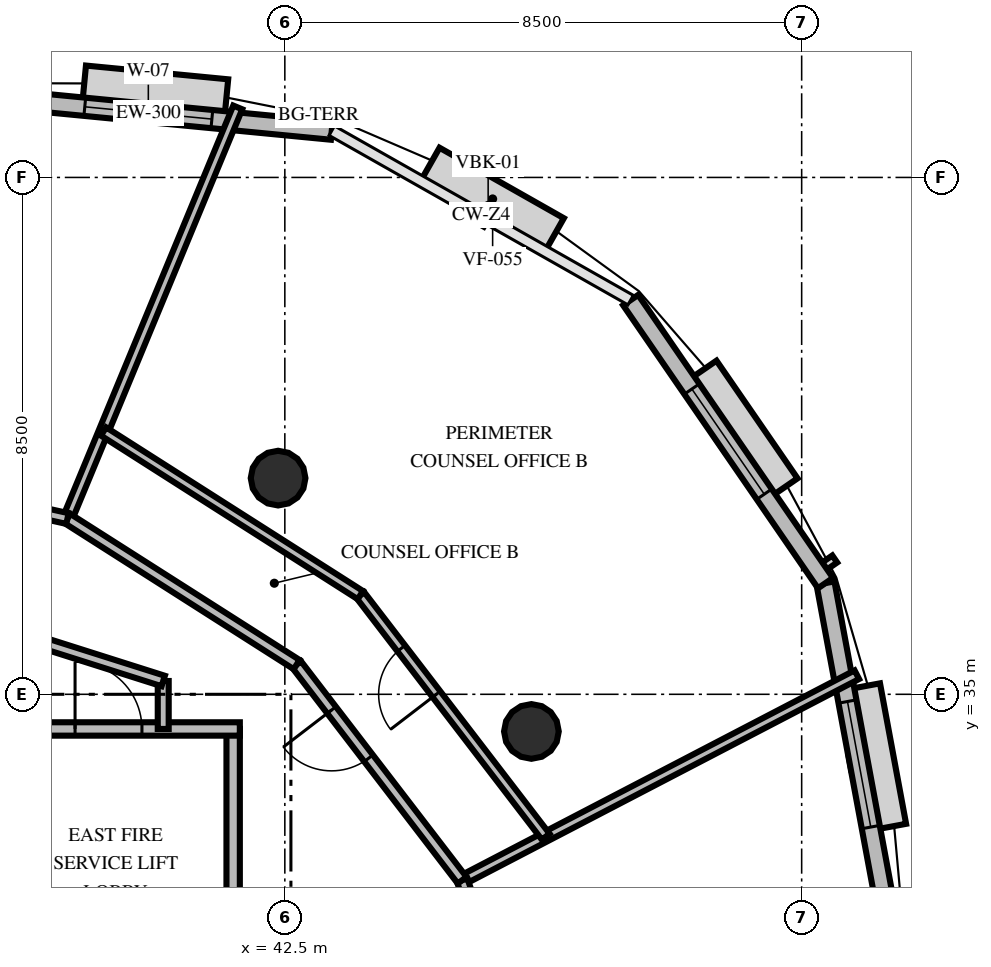
"""IFC4 building model, lengths in metres.
Left out: names, types, materials, properties, quantities, classifications, styles, units other than length and angle.
Written with IfcOpenShell. Run it as: python <this file> out.ifc"""

import sys

from ifc_helpers import new_model, si_unit, direction, frame, frame_2d, origin, origin_2d, place, context, subcontext, project, spatial, rectangle, circle, extrude, element, fill, save


model = new_model("IFC4")
c1 = context("Model", 3, precision=1e-05, world=origin(), true_north=direction((0.0, 1.0)))
c2 = subcontext(c1, "Body", "Model", "MODEL_VIEW")
j1 = project(units=[si_unit("LENGTHUNIT", "METRE"), si_unit("PLANEANGLEUNIT", "RADIAN")], contexts=[c1])
p1 = place(None, origin())
s1 = spatial("IfcSite", under=j1, at=p1, CompositionType="ELEMENT")
p2 = place(p1, origin())
s2 = spatial("IfcBuilding", under=s1, at=p2, CompositionType="ELEMENT")
p3 = place(p2, frame((0.0, 0.0, 230.4)))
s3 = spatial("IfcBuildingStorey", under=s2, at=p3, CompositionType="ELEMENT", Elevation=230.4)
for number, where, z_axis, x_axis in (
    (1, (46.555, 34.389, -0.22), (0.0, 0.0, 1.0), (1.0, 0.0, 0.0)),
    (2, (42.389, 38.555, -0.22), (0.0, 0.0, 1.0), (1.0, 0.0, 0.0)),
):
    element("IfcColumn", number, at=place(p3, frame(where, z_axis=z_axis, x_axis=x_axis)), inside=s3, PredefinedType="COLUMN", context=c2, shape_type="SweptSolid", body=[
        extrude(circle(Radius=0.45, at=origin_2d()), origin(), (0.0, 0.0, 1.0), 3.82),
    ])
p4 = place(p3, frame((43.272, 44.269, 0.0), z_axis=(0.0, 0.0, 1.0), x_axis=(-0.995368057739, 0.096137555791, 0.0)))
e3 = element("IfcWall", 3, at=p4, inside=s3, PredefinedType="SOLIDWALL", context=c2, shape_type="SweptSolid", body=[
    extrude(rectangle(XDim=6.062, YDim=0.3, at=frame_2d((3.031, 0.0))), origin(), (0.0, 0.0, 1.0), 2.76),
])
p5 = place(p4, frame((1.981, 0.0, 0.8)))
e4 = element("IfcOpeningElement", 4, at=p5, cuts=e3, PredefinedType="OPENING", context=c2, shape_type="SweptSolid", body=[
    extrude(rectangle(XDim=2.1, YDim=1.85, at=frame_2d((1.05, 0.925))), frame((0.0, 0.16, 0.0), z_axis=(0.0, -1.0, 0.0), x_axis=(1.0, 0.0, 0.0)), (0.0, 0.0, 1.0), 0.32),
])
p6 = place(p3, frame((52.498, 30.869, 0.0), z_axis=(0.0, 0.0, 1.0), x_axis=(-0.182566609736, 0.983193487066, 0.0)))
e5 = element("IfcWall", 5, at=p6, inside=s3, PredefinedType="SOLIDWALL", context=c2, shape_type="SweptSolid", body=[
    extrude(rectangle(XDim=6.062, YDim=0.3, at=frame_2d((3.031, 0.0))), origin(), (0.0, 0.0, 1.0), 2.76),
])
p7 = place(p6, frame((1.981, 0.0, 0.8)))
e6 = element("IfcOpeningElement", 6, at=p7, cuts=e5, PredefinedType="OPENING", context=c2, shape_type="SweptSolid", body=[
    extrude(rectangle(XDim=2.1, YDim=1.85, at=frame_2d((1.05, 0.925))), frame((0.0, 0.16, 0.0), z_axis=(0.0, -1.0, 0.0), x_axis=(1.0, 0.0, 0.0)), (0.0, 0.0, 1.0), 0.32),
])
p8 = place(p3, frame((51.392, 36.829, 0.0), z_axis=(0.0, 0.0, 1.0), x_axis=(-0.567062329137, 0.823674884207, 0.0)))
e7 = element("IfcWall", 7, at=p8, inside=s3, PredefinedType="SOLIDWALL", context=c2, shape_type="SweptSolid", body=[
    extrude(rectangle(XDim=5.65, YDim=0.3, at=frame_2d((2.825, 0.0))), origin(), (0.0, 0.0, 1.0), 2.76),
])
p9 = place(p8, frame((1.775, 0.0, 0.8)))
e8 = element("IfcOpeningElement", 8, at=p9, cuts=e7, PredefinedType="OPENING", context=c2, shape_type="SweptSolid", body=[
    extrude(rectangle(XDim=2.1, YDim=1.85, at=frame_2d((1.05, 0.925))), frame((0.0, 0.16, 0.0), z_axis=(0.0, -1.0, 0.0), x_axis=(1.0, 0.0, 0.0)), (0.0, 0.0, 1.0), 0.32),
])
p10 = place(p3, frame((41.65, 30.05, 0.0), z_axis=(0.0, 0.0, 1.0), x_axis=(0.0, 1.0, 0.0)))
e9 = element("IfcWall", 9, at=p10, inside=s3, PredefinedType="SOLIDWALL", context=c2, shape_type="SweptSolid", body=[
    extrude(rectangle(XDim=4.38, YDim=0.22, at=frame_2d((2.19, 0.0))), origin(), (0.0, 0.0, 1.0), 2.46),
])
p11 = place(p3, frame((37.45, 34.43, 0.0), z_axis=(0.0, 0.0, 1.0), x_axis=(1.0, 0.0, 0.0)))
e10 = element("IfcWall", 10, at=p11, inside=s3, PredefinedType="SOLIDWALL", context=c2, shape_type="SweptSolid", body=[
    extrude(rectangle(XDim=4.31, YDim=0.22, at=frame_2d((2.155, 0.0))), origin(), (0.0, 0.0, 1.0), 2.46),
])
p12 = place(p11, frame((1.6, 0.0, 0.0)))
e11 = element("IfcOpeningElement", 11, at=p12, cuts=e10, PredefinedType="OPENING", context=c2, shape_type="SweptSolid", body=[
    extrude(rectangle(XDim=1.1, YDim=2.15, at=frame_2d((0.55, 1.075))), frame((0.0, 0.12, 0.0), z_axis=(0.0, -1.0, 0.0), x_axis=(1.0, 0.0, 0.0)), (0.0, 0.0, 1.0), 0.24),
])
p13 = place(p3, frame((40.5, 35.219, 0.0), z_axis=(0.0, 0.0, 1.0), x_axis=(0.0, -1.0, 0.0)))
e12 = element("IfcWall", 12, at=p13, inside=s3, PredefinedType="PARTITIONING", context=c2, shape_type="SweptSolid", body=[
    extrude(rectangle(XDim=0.789, YDim=0.18, at=frame_2d((0.395, 0.0))), origin(), (0.0, 0.0, 1.0), 2.46),
])
p14 = place(p3, frame((34.0, 37.28, 0.0), z_axis=(0.0, 0.0, 1.0), x_axis=(0.953228121756, -0.302251795518, 0.0)))
e13 = element("IfcWall", 13, at=p14, inside=s3, PredefinedType="PARTITIONING", context=c2, shape_type="SweptSolid", body=[
    extrude(rectangle(XDim=6.819, YDim=0.18, at=frame_2d((3.409, 0.0))), origin(), (0.0, 0.0, 1.0), 2.46),
])
p15 = place(p14, frame((2.86, 0.0, 0.0)))
e14 = element("IfcOpeningElement", 14, at=p15, cuts=e13, PredefinedType="OPENING", context=c2, shape_type="SweptSolid", body=[
    extrude(rectangle(XDim=1.1, YDim=2.15, at=frame_2d((0.55, 1.075))), frame((0.0, 0.1, 0.0), z_axis=(0.0, -1.0, 0.0), x_axis=(1.0, 0.0, 0.0)), (0.0, 0.0, 1.0), 0.2),
])
p16 = place(p3, frame((45.416, 31.943, 0.0), z_axis=(0.0, 0.0, 1.0), x_axis=(0.887002051681, 0.461765481943, 0.0)))
e15 = element("IfcWall", 15, at=p16, inside=s3, PredefinedType="PARTITIONING", context=c2, shape_type="SweptSolid", body=[
    extrude(rectangle(XDim=7.318, YDim=0.16, at=frame_2d((3.659, 0.0))), origin(), (0.0, 0.0, 1.0), 2.46),
])
p17 = place(p3, frame((46.612, 28.566, 0.0), z_axis=(0.0, 0.0, 1.0), x_axis=(-0.33381812474, 0.942637501691, 0.0)))
e16 = element("IfcWall", 16, at=p17, inside=s3, PredefinedType="PARTITIONING", context=c2, shape_type="SweptSolid", body=[
    extrude(rectangle(XDim=3.582, YDim=0.18, at=frame_2d((1.791, 0.0))), origin(), (0.0, 0.0, 1.0), 2.46),
])
p18 = place(p17, frame((1.862, 0.0, 0.0)))
e17 = element("IfcOpeningElement", 17, at=p18, cuts=e16, PredefinedType="OPENING", context=c2, shape_type="SweptSolid", body=[
    extrude(rectangle(XDim=1.0, YDim=2.15, at=frame_2d((0.5, 1.075))), frame((0.0, 0.1, 0.0), z_axis=(0.0, -1.0, 0.0), x_axis=(1.0, 0.0, 0.0)), (0.0, 0.0, 1.0), 0.2),
])
p19 = place(p3, frame((38.925, 37.89, 0.0), z_axis=(0.0, 0.0, 1.0), x_axis=(0.382676871851, 0.923882249938, 0.0)))
e18 = element("IfcWall", 18, at=p19, inside=s3, PredefinedType="PARTITIONING", context=c2, shape_type="SweptSolid", body=[
    extrude(rectangle(XDim=7.318, YDim=0.16, at=frame_2d((3.659, 0.0))), origin(), (0.0, 0.0, 1.0), 2.46),
])
p20 = place(p3, frame((45.416, 31.943, 0.0), z_axis=(0.0, 0.0, 1.0), x_axis=(-0.608746835117, 0.793364538365, 0.0)))
e19 = element("IfcWall", 19, at=p20, inside=s3, PredefinedType="PARTITIONING", context=c2, shape_type="SweptSolid", body=[
    extrude(rectangle(XDim=4.47, YDim=0.18, at=frame_2d((2.235, 0.0))), origin(), (0.0, 0.0, 1.0), 2.46),
])
p21 = place(p20, frame((2.527, 0.0, 0.0)))
e20 = element("IfcOpeningElement", 20, at=p21, cuts=e19, PredefinedType="OPENING", context=c2, shape_type="SweptSolid", body=[
    extrude(rectangle(XDim=1.0, YDim=2.15, at=frame_2d((0.5, 1.075))), frame((0.0, 0.1, 0.0), z_axis=(0.0, -1.0, 0.0), x_axis=(1.0, 0.0, 0.0)), (0.0, 0.0, 1.0), 0.2),
])
p22 = place(p3, frame((42.695, 35.489, 0.0), z_axis=(0.0, 0.0, 1.0), x_axis=(-0.843391492769, 0.53729953464, 0.0)))
e21 = element("IfcWall", 21, at=p22, inside=s3, PredefinedType="PARTITIONING", context=c2, shape_type="SweptSolid", body=[
    extrude(rectangle(XDim=4.47, YDim=0.18, at=frame_2d((2.235, 0.0))), origin(), (0.0, 0.0, 1.0), 2.46),
])
p23 = place(p3, frame((46.791, 32.658, 0.0), z_axis=(0.0, 0.0, 1.0), x_axis=(-0.608777402424, 0.793341083203, 0.0)))
e22 = element("IfcWall", 22, at=p23, inside=s3, PredefinedType="PARTITIONING", context=c2, shape_type="SweptSolid", body=[
    extrude(rectangle(XDim=5.008, YDim=0.16, at=frame_2d((2.504, 0.0))), origin(), (0.0, 0.0, 1.0), 2.46),
])
p24 = place(p23, frame((2.954, 0.0, 0.0)))
e23 = element("IfcOpeningElement", 23, at=p24, cuts=e22, PredefinedType="OPENING", context=c2, shape_type="SweptSolid", body=[
    extrude(rectangle(XDim=0.95, YDim=2.15, at=frame_2d((0.475, 1.075))), frame((0.0, 0.09, 0.0), z_axis=(0.0, -1.0, 0.0), x_axis=(1.0, 0.0, 0.0)), (0.0, 0.0, 1.0), 0.18),
])
p25 = place(p3, frame((43.742, 36.632, 0.0), z_axis=(0.0, 0.0, 1.0), x_axis=(-0.84339841599, 0.537288667204, 0.0)))
e24 = element("IfcWall", 24, at=p25, inside=s3, PredefinedType="PARTITIONING", context=c2, shape_type="SweptSolid", body=[
    extrude(rectangle(XDim=5.008, YDim=0.16, at=frame_2d((2.504, 0.0))), origin(), (0.0, 0.0, 1.0), 2.46),
])
p26 = place(p3, frame((38.925, 37.89, 0.0), z_axis=(0.0, 0.0, 1.0), x_axis=(-0.976291048481, 0.216461979699, 0.0)))
e25 = element("IfcWall", 25, at=p26, inside=s3, PredefinedType="PARTITIONING", context=c2, shape_type="SweptSolid", body=[
    extrude(rectangle(XDim=4.47, YDim=0.18, at=frame_2d((2.235, 0.0))), origin(), (0.0, 0.0, 1.0), 2.46),
])
p27 = place(p5, origin())
e26 = element("IfcWindow", 26, at=p27, inside=s3, PartitioningType="SINGLE_PANEL", PredefinedType="WINDOW", context=c2, shape_type="SweptSolid", body=[
    extrude(rectangle(XDim=2.1, YDim=1.85, at=frame_2d((1.05, 0.925))), frame((0.0, 0.03, 0.0), z_axis=(0.0, -1.0, 0.0), x_axis=(1.0, 0.0, 0.0)), (0.0, 0.0, 1.0), 0.06),
])
fill(e4, e26)
p28 = place(p7, origin())
e27 = element("IfcWindow", 27, at=p28, inside=s3, PartitioningType="SINGLE_PANEL", PredefinedType="WINDOW", context=c2, shape_type="SweptSolid", body=[
    extrude(rectangle(XDim=2.1, YDim=1.85, at=frame_2d((1.05, 0.925))), frame((0.0, 0.03, 0.0), z_axis=(0.0, -1.0, 0.0), x_axis=(1.0, 0.0, 0.0)), (0.0, 0.0, 1.0), 0.06),
])
fill(e6, e27)
p29 = place(p9, origin())
e28 = element("IfcWindow", 28, at=p29, inside=s3, PartitioningType="SINGLE_PANEL", PredefinedType="WINDOW", context=c2, shape_type="SweptSolid", body=[
    extrude(rectangle(XDim=2.1, YDim=1.85, at=frame_2d((1.05, 0.925))), frame((0.0, 0.03, 0.0), z_axis=(0.0, -1.0, 0.0), x_axis=(1.0, 0.0, 0.0)), (0.0, 0.0, 1.0), 0.06),
])
fill(e8, e28)
p30 = place(p12, origin())
e29 = element("IfcDoor", 29, at=p30, inside=s3, OperationType="SINGLE_SWING_LEFT", PredefinedType="DOOR", context=c2, shape_type="SweptSolid", body=[
    extrude(rectangle(XDim=1.1, YDim=2.15, at=frame_2d((0.55, 1.075))), frame((0.0, 0.025, 0.0), z_axis=(0.0, -1.0, 0.0), x_axis=(1.0, 0.0, 0.0)), (0.0, 0.0, 1.0), 0.05),
])
fill(e11, e29)
p31 = place(p21, origin())
e30 = element("IfcDoor", 30, at=p31, inside=s3, OperationType="SINGLE_SWING_RIGHT", PredefinedType="DOOR", context=c2, shape_type="SweptSolid", body=[
    extrude(rectangle(XDim=1.0, YDim=2.15, at=frame_2d((0.5, 1.075))), frame((0.0, 0.025, 0.0), z_axis=(0.0, -1.0, 0.0), x_axis=(1.0, 0.0, 0.0)), (0.0, 0.0, 1.0), 0.05),
])
fill(e20, e30)
p32 = place(p24, origin())
e31 = element("IfcDoor", 31, at=p32, inside=s3, OperationType="SINGLE_SWING_LEFT", PredefinedType="DOOR", context=c2, shape_type="SweptSolid", body=[
    extrude(rectangle(XDim=0.95, YDim=2.15, at=frame_2d((0.475, 1.075))), frame((0.0, 0.025, 0.0), z_axis=(0.0, -1.0, 0.0), x_axis=(1.0, 0.0, 0.0)), (0.0, 0.0, 1.0), 0.05),
])
fill(e23, e31)
save(model, sys.argv[1])
